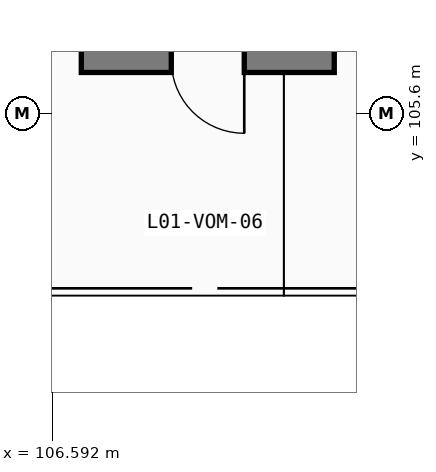
"""IFC4 building model, lengths in metres.
Left out: names, types, materials, properties, quantities, classifications, styles, units other than length and angle.
Written with IfcOpenShell. Run it as: python <this file> out.ifc"""

import sys

from ifc_helpers import new_model, si_unit, direction, frame, frame_2d, origin, place, context, subcontext, project, spatial, rectangle, extrude, element, fill, save


model = new_model("IFC4")
c1 = context("Model", 3, precision=1e-05, world=origin(), true_north=direction((0.0, 1.0)))
c2 = subcontext(c1, "Body", "Model", "MODEL_VIEW")
j1 = project(units=[si_unit("LENGTHUNIT", "METRE"), si_unit("PLANEANGLEUNIT", "RADIAN")], contexts=[c1])
p1 = place(None, origin())
s1 = spatial("IfcSite", under=j1, at=p1, CompositionType="ELEMENT")
p2 = place(p1, origin())
s2 = spatial("IfcBuilding", under=s1, at=p2, CompositionType="ELEMENT")
p3 = place(p2, frame((0.0, 0.0, 4.8)))
s3 = spatial("IfcBuildingStorey", under=s2, at=p3, CompositionType="ELEMENT", Elevation=4.8)
p4 = place(p3, frame((107.07, 106.47, 0.0), z_axis=(0.0, 0.0, 1.0), x_axis=(1.0, 0.0, 0.0)))
e1 = element("IfcWall", 1, at=p4, inside=s3, PredefinedType="SHEAR", context=c2, shape_type="SweptSolid", body=[
    extrude(rectangle(XDim=4.16, YDim=0.4, at=frame_2d((2.08, 0.0))), origin(), (0.0, 0.0, 1.0), 4.52),
])
p5 = place(p4, frame((2.68, 0.0, 0.0), z_axis=(0.0, 0.0, 1.0), x_axis=(-1.0, 0.0, 0.0)))
e2 = element("IfcOpeningElement", 2, at=p5, cuts=e1, PredefinedType="OPENING", context=c2, shape_type="SweptSolid", body=[
    extrude(rectangle(XDim=1.2, YDim=2.2, at=frame_2d((0.6, 1.1))), frame((0.0, 0.21, 0.0), z_axis=(0.0, -1.0, 0.0), x_axis=(1.0, 0.0, 0.0)), (0.0, 0.0, 1.0), 0.42),
])
p6 = place(p5, origin())
e3 = element("IfcDoor", 3, at=p6, inside=s3, OperationType="SINGLE_SWING_LEFT", PredefinedType="DOOR", context=c2, shape_type="SweptSolid", body=[
    extrude(rectangle(XDim=1.2, YDim=2.2, at=frame_2d((0.6, 1.1))), frame((0.0, 0.025, 0.0), z_axis=(0.0, -1.0, 0.0), x_axis=(1.0, 0.0, 0.0)), (0.0, 0.0, 1.0), 0.05),
])
fill(e2, e3)
save(model, sys.argv[1])
